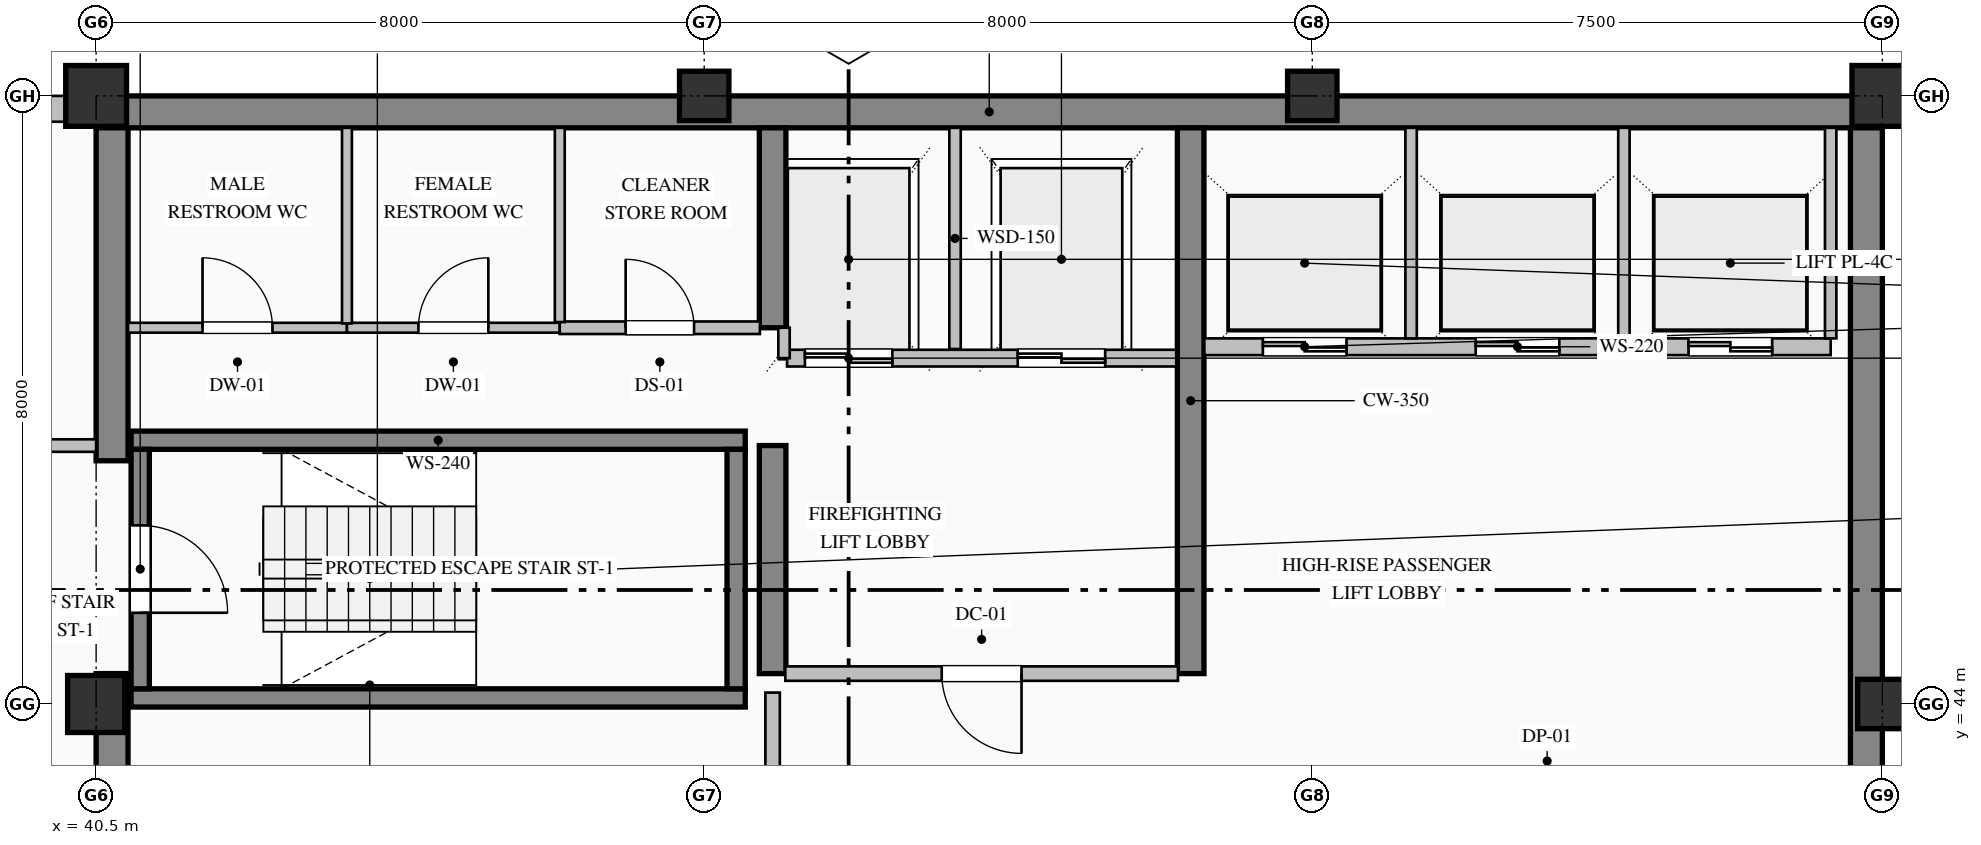
"""IFC4 building model, lengths in metres.
Left out: names, types, materials, properties, quantities, classifications, styles, units other than length and angle.
Written with IfcOpenShell. Run it as: python <this file> out.ifc"""

import sys

from ifc_helpers import new_model, si_unit, direction, frame, frame_2d, origin, origin_2d, place, context, subcontext, project, spatial, rectangle, hollow_rectangle, extrude, element, fill, save


model = new_model("IFC4")
c1 = context("Model", 3, precision=1e-05, world=origin(), true_north=direction((0.0, 1.0)))
c2 = subcontext(c1, "Body", "Model", "MODEL_VIEW")
j1 = project(units=[si_unit("LENGTHUNIT", "METRE"), si_unit("PLANEANGLEUNIT", "RADIAN")], contexts=[c1])
p1 = place(None, origin())
s1 = spatial("IfcSite", under=j1, at=p1, CompositionType="ELEMENT")
p2 = place(p1, origin())
s2 = spatial("IfcBuilding", under=s1, at=p2, CompositionType="ELEMENT")
p3 = place(p2, frame((0.0, 0.0, 335.2)))
s3 = spatial("IfcBuildingStorey", under=s2, at=p3, CompositionType="ELEMENT", Elevation=335.2)
p4 = place(p3, frame((40.5, 51.79, 0.0), z_axis=(0.0, 0.0, 1.0), x_axis=(1.0, 0.0, 0.0)))
e1 = element("IfcWall", 1, at=p4, inside=s3, PredefinedType="SHEAR", context=c2, shape_type="SweptSolid", body=[
    extrude(rectangle(XDim=23.5, YDim=0.42, at=frame_2d((11.75, 0.0))), origin(), (0.0, 0.0, 1.0), 3.785),
])
p5 = place(p3, frame((63.79, 36.32, 0.0), z_axis=(0.0, 0.0, 1.0), x_axis=(0.0, 1.0, 0.0)))
e2 = element("IfcWall", 2, at=p5, inside=s3, PredefinedType="SHEAR", context=c2, shape_type="SweptSolid", body=[
    extrude(rectangle(XDim=15.26, YDim=0.42, at=frame_2d((7.63, 0.0))), origin(), (0.0, 0.0, 1.0), 3.785),
])
p6 = place(p3, frame((40.71, 36.42, 0.0), z_axis=(0.0, 0.0, 1.0), x_axis=(0.0, 1.0, 0.0)))
e3 = element("IfcWall", 3, at=p6, inside=s3, PredefinedType="SHEAR", context=c2, shape_type="SweptSolid", body=[
    extrude(rectangle(XDim=7.98, YDim=0.42, at=frame_2d((3.99, 0.0))), origin(), (0.0, 0.0, 1.0), 3.785),
])
p7 = place(p3, frame((40.71, 47.2, 0.0), z_axis=(0.0, 0.0, 1.0), x_axis=(0.0, 1.0, 0.0)))
e4 = element("IfcWall", 4, at=p7, inside=s3, PredefinedType="SHEAR", context=c2, shape_type="SweptSolid", body=[
    extrude(rectangle(XDim=4.38, YDim=0.42, at=frame_2d((2.19, 0.0))), origin(), (0.0, 0.0, 1.0), 3.785),
])
p8 = place(p3, frame((49.4, 44.4, 0.0), z_axis=(0.0, 0.0, 1.0), x_axis=(0.0, 1.0, 0.0)))
e5 = element("IfcWall", 5, at=p8, inside=s3, PredefinedType="SHEAR", context=c2, shape_type="SweptSolid", body=[
    extrude(rectangle(XDim=3.0, YDim=0.35, at=frame_2d((1.5, 0.0))), origin(), (0.0, 0.0, 1.0), 3.785),
])
p9 = place(p3, frame((49.4, 48.95, 0.0), z_axis=(0.0, 0.0, 1.0), x_axis=(0.0, 1.0, 0.0)))
e6 = element("IfcWall", 6, at=p9, inside=s3, PredefinedType="SHEAR", context=c2, shape_type="SweptSolid", body=[
    extrude(rectangle(XDim=2.63, YDim=0.35, at=frame_2d((1.315, 0.0))), origin(), (0.0, 0.0, 1.0), 3.785),
])
p10 = place(p3, frame((54.9, 44.4, 0.0), z_axis=(0.0, 0.0, 1.0), x_axis=(0.0, 1.0, 0.0)))
e7 = element("IfcWall", 7, at=p10, inside=s3, PredefinedType="SHEAR", context=c2, shape_type="SweptSolid", body=[
    extrude(rectangle(XDim=7.18, YDim=0.35, at=frame_2d((3.59, 0.0))), origin(), (0.0, 0.0, 1.0), 3.785),
])
p11 = place(p3, frame((40.5, 44.0, 0.0), z_axis=(0.0, 0.0, 1.0), x_axis=(1.0, 0.0, 0.0)))
e8 = element("IfcColumn", 8, at=p11, inside=s3, PredefinedType="COLUMN", context=c2, shape_type="SweptSolid", body=[
    extrude(rectangle(XDim=0.75, YDim=0.75, at=origin_2d()), origin(), (0.0, 0.0, 1.0), 4.0),
])
p12 = place(p3, frame((40.5, 52.0, 0.0), z_axis=(0.0, 0.0, 1.0), x_axis=(1.0, 0.0, 0.0)))
e9 = element("IfcColumn", 9, at=p12, inside=s3, PredefinedType="COLUMN", context=c2, shape_type="SweptSolid", body=[
    extrude(hollow_rectangle(XDim=0.8, YDim=0.8, WallThickness=0.032, at=origin_2d()), origin(), (0.0, 0.0, 1.0), 4.0),
])
for number, where, z_axis, x_axis in (
    (10, (48.5, 52.0, 0.0), (0.0, 0.0, 1.0), (1.0, 0.0, 0.0)),
    (11, (56.5, 52.0, 0.0), (0.0, 0.0, 1.0), (1.0, 0.0, 0.0)),
    (12, (64.0, 44.0, 0.0), (0.0, 0.0, 1.0), (1.0, 0.0, 0.0)),
):
    element("IfcColumn", number, at=place(p3, frame(where, z_axis=z_axis, x_axis=x_axis)), inside=s3, PredefinedType="COLUMN", context=c2, shape_type="SweptSolid", body=[
        extrude(hollow_rectangle(XDim=0.65, YDim=0.65, WallThickness=0.028, at=origin_2d()), origin(), (0.0, 0.0, 1.0), 4.0),
    ])
p13 = place(p3, frame((64.0, 52.0, 0.0), z_axis=(0.0, 0.0, 1.0), x_axis=(1.0, 0.0, 0.0)))
e13 = element("IfcColumn", 13, at=p13, inside=s3, PredefinedType="COLUMN", context=c2, shape_type="SweptSolid", body=[
    extrude(hollow_rectangle(XDim=0.8, YDim=0.8, WallThickness=0.032, at=origin_2d()), origin(), (0.0, 0.0, 1.0), 4.0),
])
p14 = place(p3, frame((20.5, 51.83, 0.0), z_axis=(0.0, 0.0, 1.0), x_axis=(1.0, 0.0, 0.0)))
e14 = element("IfcWall", 14, at=p14, inside=s3, PredefinedType="SOLIDWALL", context=c2, shape_type="SweptSolid", body=[
    extrude(rectangle(XDim=20.02, YDim=0.34, at=frame_2d((10.01, 0.0))), origin(), (0.0, 0.0, 1.0), 3.335),
])
p15 = place(p14, frame((6.725, 0.0, 0.9)))
e15 = element("IfcOpeningElement", 15, at=p15, cuts=e14, PredefinedType="OPENING", context=c2, shape_type="SweptSolid", body=[
    extrude(rectangle(XDim=0.95, YDim=1.85, at=frame_2d((0.475, 0.925))), frame((0.0, 0.18, 0.0), z_axis=(0.0, -1.0, 0.0), x_axis=(1.0, 0.0, 0.0)), (0.0, 0.0, 1.0), 0.36),
])
p16 = place(p14, frame((10.275, 0.0, 0.8)))
e16 = element("IfcOpeningElement", 16, at=p16, cuts=e14, PredefinedType="OPENING", context=c2, shape_type="SweptSolid", body=[
    extrude(rectangle(XDim=1.05, YDim=2.15, at=frame_2d((0.525, 1.075))), frame((0.0, 0.18, 0.0), z_axis=(0.0, -1.0, 0.0), x_axis=(1.0, 0.0, 0.0)), (0.0, 0.0, 1.0), 0.36),
])
for number, where, z_axis, x_axis in (
    (17, (40.96, 47.47, 0.0), (0.0, 0.0, 1.0), (1.0, 0.0, 0.0)),
    (18, (49.04, 44.08, 0.0), (0.0, 0.0, 1.0), (-1.0, 0.0, 0.0)),
):
    element("IfcWall", number, at=place(p3, frame(where, z_axis=z_axis, x_axis=x_axis)), inside=s3, PredefinedType="SOLIDWALL", context=c2, shape_type="SweptSolid", body=[
        extrude(rectangle(XDim=8.08, YDim=0.24, at=frame_2d((4.04, 0.0))), origin(), (0.0, 0.0, 1.0), 4.0),
    ])
p17 = place(p3, frame((41.08, 47.35, 0.0), z_axis=(0.0, 0.0, 1.0), x_axis=(0.0, -1.0, 0.0)))
e19 = element("IfcWall", 19, at=p17, inside=s3, PredefinedType="SOLIDWALL", context=c2, shape_type="SweptSolid", body=[
    extrude(rectangle(XDim=3.15, YDim=0.24, at=frame_2d((1.575, 0.0))), origin(), (0.0, 0.0, 1.0), 4.0),
])
p18 = place(p17, frame((1.0, 0.0, 0.0)))
e20 = element("IfcOpeningElement", 20, at=p18, cuts=e19, PredefinedType="OPENING", context=c2, shape_type="SweptSolid", body=[
    extrude(rectangle(XDim=1.15, YDim=2.2, at=frame_2d((0.575, 1.1))), frame((0.0, 0.13, 0.0), z_axis=(0.0, -1.0, 0.0), x_axis=(1.0, 0.0, 0.0)), (0.0, 0.0, 1.0), 0.26),
])
p19 = place(p3, frame((48.92, 44.2, 0.0), z_axis=(0.0, 0.0, 1.0), x_axis=(0.0, 1.0, 0.0)))
e21 = element("IfcWall", 21, at=p19, inside=s3, PredefinedType="SOLIDWALL", context=c2, shape_type="SweptSolid", body=[
    extrude(rectangle(XDim=3.15, YDim=0.24, at=frame_2d((1.575, 0.0))), origin(), (0.0, 0.0, 1.0), 4.0),
])
p20 = place(p3, frame((54.71, 48.55, 0.0), z_axis=(0.0, 0.0, 1.0), x_axis=(-1.0, 0.0, 0.0)))
e22 = element("IfcWall", 22, at=p20, inside=s3, PredefinedType="PARTITIONING", context=c2, shape_type="SweptSolid", body=[
    extrude(rectangle(XDim=5.12, YDim=0.22, at=frame_2d((2.56, 0.0))), origin(), (0.0, 0.0, 1.0), 3.785),
])
p21 = place(p20, frame((3.735, 0.0, 0.0)))
e23 = element("IfcOpeningElement", 23, at=p21, cuts=e22, PredefinedType="OPENING", context=c2, shape_type="SweptSolid", body=[
    extrude(rectangle(XDim=1.15, YDim=2.2, at=frame_2d((0.575, 1.1))), frame((0.0, 0.12, 0.0), z_axis=(0.0, -1.0, 0.0), x_axis=(1.0, 0.0, 0.0)), (0.0, 0.0, 1.0), 0.24),
])
p22 = place(p20, frame((0.935, 0.0, 0.0)))
e24 = element("IfcOpeningElement", 24, at=p22, cuts=e22, PredefinedType="OPENING", context=c2, shape_type="SweptSolid", body=[
    extrude(rectangle(XDim=1.15, YDim=2.2, at=frame_2d((0.575, 1.1))), frame((0.0, 0.12, 0.0), z_axis=(0.0, -1.0, 0.0), x_axis=(1.0, 0.0, 0.0)), (0.0, 0.0, 1.0), 0.24),
])
p23 = place(p3, frame((51.8, 48.67, 0.0), z_axis=(0.0, 0.0, 1.0), x_axis=(0.0, 1.0, 0.0)))
e25 = element("IfcWall", 25, at=p23, inside=s3, PredefinedType="PARTITIONING", context=c2, shape_type="SweptSolid", body=[
    extrude(rectangle(XDim=2.91, YDim=0.15, at=frame_2d((1.455, 0.0))), origin(), (0.0, 0.0, 1.0), 3.785),
])
p24 = place(p3, frame((49.55, 48.55, 0.0), z_axis=(0.0, 0.0, 1.0), x_axis=(0.0, 1.0, 0.0)))
e26 = element("IfcWall", 26, at=p24, inside=s3, PredefinedType="PARTITIONING", context=c2, shape_type="SweptSolid", body=[
    extrude(rectangle(XDim=0.4, YDim=0.15, at=frame_2d((0.2, 0.0))), origin(), (0.0, 0.0, 1.0), 3.785),
])
p25 = place(p3, frame((63.32, 48.7, 0.0), z_axis=(0.0, 0.0, 1.0), x_axis=(-1.0, 0.0, 0.0)))
e27 = element("IfcWall", 27, at=p25, inside=s3, PredefinedType="PARTITIONING", context=c2, shape_type="SweptSolid", body=[
    extrude(rectangle(XDim=8.24, YDim=0.22, at=frame_2d((4.12, 0.0))), origin(), (0.0, 0.0, 1.0), 3.785),
])
p26 = place(p25, frame((6.37, 0.0, 0.0)))
e28 = element("IfcOpeningElement", 28, at=p26, cuts=e27, PredefinedType="OPENING", context=c2, shape_type="SweptSolid", body=[
    extrude(rectangle(XDim=1.1, YDim=2.2, at=frame_2d((0.55, 1.1))), frame((0.0, 0.12, 0.0), z_axis=(0.0, -1.0, 0.0), x_axis=(1.0, 0.0, 0.0)), (0.0, 0.0, 1.0), 0.24),
])
p27 = place(p25, frame((3.57, 0.0, 0.0)))
e29 = element("IfcOpeningElement", 29, at=p27, cuts=e27, PredefinedType="OPENING", context=c2, shape_type="SweptSolid", body=[
    extrude(rectangle(XDim=1.1, YDim=2.2, at=frame_2d((0.55, 1.1))), frame((0.0, 0.12, 0.0), z_axis=(0.0, -1.0, 0.0), x_axis=(1.0, 0.0, 0.0)), (0.0, 0.0, 1.0), 0.24),
])
p28 = place(p25, frame((0.77, 0.0, 0.0)))
e30 = element("IfcOpeningElement", 30, at=p28, cuts=e27, PredefinedType="OPENING", context=c2, shape_type="SweptSolid", body=[
    extrude(rectangle(XDim=1.1, YDim=2.2, at=frame_2d((0.55, 1.1))), frame((0.0, 0.12, 0.0), z_axis=(0.0, -1.0, 0.0), x_axis=(1.0, 0.0, 0.0)), (0.0, 0.0, 1.0), 0.24),
])
for number, where, z_axis, x_axis in (
    (31, (57.8, 48.81, 0.0), (0.0, 0.0, 1.0), (0.0, 1.0, 0.0)),
    (32, (60.6, 48.81, 0.0), (0.0, 0.0, 1.0), (0.0, 1.0, 0.0)),
    (33, (63.32, 48.81, 0.0), (0.0, 0.0, 1.0), (0.0, 1.0, 0.0)),
):
    element("IfcWall", number, at=place(p3, frame(where, z_axis=z_axis, x_axis=x_axis)), inside=s3, PredefinedType="PARTITIONING", context=c2, shape_type="SweptSolid", body=[
        extrude(rectangle(XDim=2.77, YDim=0.15, at=frame_2d((1.385, 0.0))), origin(), (0.0, 0.0, 1.0), 3.785),
    ])
p29 = place(p3, frame((37.8, 47.4, 0.0), z_axis=(0.0, 0.0, 1.0), x_axis=(1.0, 0.0, 0.0)))
e34 = element("IfcWall", 34, at=p29, inside=s3, PredefinedType="PARTITIONING", context=c2, shape_type="SweptSolid", body=[
    extrude(rectangle(XDim=2.7, YDim=0.165, at=frame_2d((1.35, 0.0))), origin(), (0.0, 0.0, 1.0), 3.785),
])
p30 = place(p29, frame((0.825, 0.0, 0.0)))
e35 = element("IfcOpeningElement", 35, at=p30, cuts=e34, PredefinedType="OPENING", context=c2, shape_type="SweptSolid", body=[
    extrude(rectangle(XDim=1.05, YDim=2.15, at=frame_2d((0.525, 1.075))), frame((0.0, 0.093, 0.0), z_axis=(0.0, -1.0, 0.0), x_axis=(1.0, 0.0, 0.0)), (0.0, 0.0, 1.0), 0.185),
])
p31 = place(p3, frame((40.92, 48.95, 0.0), z_axis=(0.0, 0.0, 1.0), x_axis=(1.0, 0.0, 0.0)))
e36 = element("IfcWall", 36, at=p31, inside=s3, PredefinedType="PARTITIONING", context=c2, shape_type="SweptSolid", body=[
    extrude(rectangle(XDim=2.88, YDim=0.13, at=frame_2d((1.44, 0.0))), origin(), (0.0, 0.0, 1.0), 3.785),
])
p32 = place(p31, frame((0.98, 0.0, 0.0)))
e37 = element("IfcOpeningElement", 37, at=p32, cuts=e36, PredefinedType="OPENING", context=c2, shape_type="SweptSolid", body=[
    extrude(rectangle(XDim=0.92, YDim=2.15, at=frame_2d((0.46, 1.075))), frame((0.0, 0.075, 0.0), z_axis=(0.0, -1.0, 0.0), x_axis=(1.0, 0.0, 0.0)), (0.0, 0.0, 1.0), 0.15),
])
p33 = place(p3, frame((43.8, 48.95, 0.0), z_axis=(0.0, 0.0, 1.0), x_axis=(1.0, 0.0, 0.0)))
e38 = element("IfcWall", 38, at=p33, inside=s3, PredefinedType="PARTITIONING", context=c2, shape_type="SweptSolid", body=[
    extrude(rectangle(XDim=2.8, YDim=0.13, at=frame_2d((1.4, 0.0))), origin(), (0.0, 0.0, 1.0), 3.785),
])
p34 = place(p33, frame((0.94, 0.0, 0.0)))
e39 = element("IfcOpeningElement", 39, at=p34, cuts=e38, PredefinedType="OPENING", context=c2, shape_type="SweptSolid", body=[
    extrude(rectangle(XDim=0.92, YDim=2.15, at=frame_2d((0.46, 1.075))), frame((0.0, 0.075, 0.0), z_axis=(0.0, -1.0, 0.0), x_axis=(1.0, 0.0, 0.0)), (0.0, 0.0, 1.0), 0.15),
])
p35 = place(p3, frame((46.6, 48.95, 0.0), z_axis=(0.0, 0.0, 1.0), x_axis=(1.0, 0.0, 0.0)))
e40 = element("IfcWall", 40, at=p35, inside=s3, PredefinedType="PARTITIONING", context=c2, shape_type="SweptSolid", body=[
    extrude(rectangle(XDim=2.633, YDim=0.165, at=frame_2d((1.316, 0.0))), origin(), (0.0, 0.0, 1.0), 3.785),
])
p36 = place(p35, frame((0.866, 0.0, 0.0)))
e41 = element("IfcOpeningElement", 41, at=p36, cuts=e40, PredefinedType="OPENING", context=c2, shape_type="SweptSolid", body=[
    extrude(rectangle(XDim=0.9, YDim=2.15, at=frame_2d((0.45, 1.075))), frame((0.0, 0.093, 0.0), z_axis=(0.0, -1.0, 0.0), x_axis=(1.0, 0.0, 0.0)), (0.0, 0.0, 1.0), 0.185),
])
p37 = place(p3, frame((54.733, 44.4, 0.0), z_axis=(0.0, 0.0, 1.0), x_axis=(-1.0, 0.0, 0.0)))
e42 = element("IfcWall", 42, at=p37, inside=s3, PredefinedType="PARTITIONING", context=c2, shape_type="SweptSolid", body=[
    extrude(rectangle(XDim=5.166, YDim=0.19, at=frame_2d((2.583, 0.0))), origin(), (0.0, 0.0, 1.0), 3.785),
])
p38 = place(p37, frame((2.058, 0.0, 0.0)))
e43 = element("IfcOpeningElement", 43, at=p38, cuts=e42, PredefinedType="OPENING", context=c2, shape_type="SweptSolid", body=[
    extrude(rectangle(XDim=1.05, YDim=2.15, at=frame_2d((0.525, 1.075))), frame((0.0, 0.105, 0.0), z_axis=(0.0, -1.0, 0.0), x_axis=(1.0, 0.0, 0.0)), (0.0, 0.0, 1.0), 0.21),
])
p39 = place(p3, frame((49.4, 40.487, 0.0), z_axis=(0.0, 0.0, 1.0), x_axis=(0.0, 1.0, 0.0)))
e44 = element("IfcWall", 44, at=p39, inside=s3, PredefinedType="PARTITIONING", context=c2, shape_type="SweptSolid", body=[
    extrude(rectangle(XDim=3.663, YDim=0.19, at=frame_2d((1.832, 0.0))), origin(), (0.0, 0.0, 1.0), 3.027),
])
p40 = place(p39, frame((1.132, 0.0, 0.0)))
e45 = element("IfcOpeningElement", 45, at=p40, cuts=e44, PredefinedType="OPENING", context=c2, shape_type="SweptSolid", body=[
    extrude(rectangle(XDim=1.4, YDim=2.25, at=frame_2d((0.7, 1.125))), frame((0.0, 0.105, 0.0), z_axis=(0.0, -1.0, 0.0), x_axis=(1.0, 0.0, 0.0)), (0.0, 0.0, 1.0), 0.21),
])
p41 = place(p3, frame((43.8, 51.58, 0.0), z_axis=(0.0, 0.0, 1.0), x_axis=(0.0, -1.0, 0.0)))
e46 = element("IfcWall", 46, at=p41, inside=s3, PredefinedType="PARTITIONING", context=c2, shape_type="SweptSolid", body=[
    extrude(rectangle(XDim=2.573, YDim=0.13, at=frame_2d((1.287, 0.0))), origin(), (0.0, 0.0, 1.0), 3.785),
])
p42 = place(p3, frame((46.6, 51.58, 0.0), z_axis=(0.0, 0.0, 1.0), x_axis=(0.0, -1.0, 0.0)))
e47 = element("IfcWall", 47, at=p42, inside=s3, PredefinedType="PARTITIONING", context=c2, shape_type="SweptSolid", body=[
    extrude(rectangle(XDim=2.556, YDim=0.13, at=frame_2d((1.278, 0.0))), origin(), (0.0, 0.0, 1.0), 3.785),
])
p43 = place(p18, origin())
e48 = element("IfcDoor", 48, at=p43, inside=s3, OperationType="SINGLE_SWING_RIGHT", PredefinedType="DOOR", context=c2, shape_type="SweptSolid", body=[
    extrude(rectangle(XDim=1.15, YDim=2.2, at=frame_2d((0.575, 1.1))), frame((0.0, 0.025, 0.0), z_axis=(0.0, -1.0, 0.0), x_axis=(1.0, 0.0, 0.0)), (0.0, 0.0, 1.0), 0.05),
])
fill(e20, e48)
p44 = place(p21, origin())
e49 = element("IfcDoor", 49, at=p44, inside=s3, OperationType="DOUBLE_DOOR_SLIDING", PredefinedType="DOOR", context=c2, shape_type="SweptSolid", body=[
    extrude(rectangle(XDim=1.15, YDim=2.2, at=frame_2d((0.575, 1.1))), frame((0.0, 0.025, 0.0), z_axis=(0.0, -1.0, 0.0), x_axis=(1.0, 0.0, 0.0)), (0.0, 0.0, 1.0), 0.05),
])
fill(e23, e49)
p45 = place(p22, origin())
e50 = element("IfcDoor", 50, at=p45, inside=s3, OperationType="DOUBLE_DOOR_SLIDING", PredefinedType="DOOR", context=c2, shape_type="SweptSolid", body=[
    extrude(rectangle(XDim=1.15, YDim=2.2, at=frame_2d((0.575, 1.1))), frame((0.0, 0.025, 0.0), z_axis=(0.0, -1.0, 0.0), x_axis=(1.0, 0.0, 0.0)), (0.0, 0.0, 1.0), 0.05),
])
fill(e24, e50)
p46 = place(p26, origin())
e51 = element("IfcDoor", 51, at=p46, inside=s3, OperationType="DOUBLE_DOOR_SLIDING", PredefinedType="DOOR", context=c2, shape_type="SweptSolid", body=[
    extrude(rectangle(XDim=1.1, YDim=2.2, at=frame_2d((0.55, 1.1))), frame((0.0, 0.025, 0.0), z_axis=(0.0, -1.0, 0.0), x_axis=(1.0, 0.0, 0.0)), (0.0, 0.0, 1.0), 0.05),
])
fill(e28, e51)
p47 = place(p27, origin())
e52 = element("IfcDoor", 52, at=p47, inside=s3, OperationType="DOUBLE_DOOR_SLIDING", PredefinedType="DOOR", context=c2, shape_type="SweptSolid", body=[
    extrude(rectangle(XDim=1.1, YDim=2.2, at=frame_2d((0.55, 1.1))), frame((0.0, 0.025, 0.0), z_axis=(0.0, -1.0, 0.0), x_axis=(1.0, 0.0, 0.0)), (0.0, 0.0, 1.0), 0.05),
])
fill(e29, e52)
p48 = place(p28, origin())
e53 = element("IfcDoor", 53, at=p48, inside=s3, OperationType="DOUBLE_DOOR_SLIDING", PredefinedType="DOOR", context=c2, shape_type="SweptSolid", body=[
    extrude(rectangle(XDim=1.1, YDim=2.2, at=frame_2d((0.55, 1.1))), frame((0.0, 0.025, 0.0), z_axis=(0.0, -1.0, 0.0), x_axis=(1.0, 0.0, 0.0)), (0.0, 0.0, 1.0), 0.05),
])
fill(e30, e53)
p49 = place(p38, origin())
e54 = element("IfcDoor", 54, at=p49, inside=s3, OperationType="SINGLE_SWING_LEFT", PredefinedType="DOOR", context=c2, shape_type="SweptSolid", body=[
    extrude(rectangle(XDim=1.05, YDim=2.15, at=frame_2d((0.525, 1.075))), frame((0.0, 0.025, 0.0), z_axis=(0.0, -1.0, 0.0), x_axis=(1.0, 0.0, 0.0)), (0.0, 0.0, 1.0), 0.05),
])
fill(e43, e54)
p50 = place(p32, origin())
e55 = element("IfcDoor", 55, at=p50, inside=s3, OperationType="SINGLE_SWING_LEFT", PredefinedType="DOOR", context=c2, shape_type="SweptSolid", body=[
    extrude(rectangle(XDim=0.92, YDim=2.15, at=frame_2d((0.46, 1.075))), frame((0.0, 0.025, 0.0), z_axis=(0.0, -1.0, 0.0), x_axis=(1.0, 0.0, 0.0)), (0.0, 0.0, 1.0), 0.05),
])
fill(e37, e55)
p51 = place(p34, origin())
e56 = element("IfcDoor", 56, at=p51, inside=s3, OperationType="SINGLE_SWING_RIGHT", PredefinedType="DOOR", context=c2, shape_type="SweptSolid", body=[
    extrude(rectangle(XDim=0.92, YDim=2.15, at=frame_2d((0.46, 1.075))), frame((0.0, 0.025, 0.0), z_axis=(0.0, -1.0, 0.0), x_axis=(1.0, 0.0, 0.0)), (0.0, 0.0, 1.0), 0.05),
])
fill(e39, e56)
p52 = place(p36, origin())
e57 = element("IfcDoor", 57, at=p52, inside=s3, OperationType="SINGLE_SWING_LEFT", PredefinedType="DOOR", context=c2, shape_type="SweptSolid", body=[
    extrude(rectangle(XDim=0.9, YDim=2.15, at=frame_2d((0.45, 1.075))), frame((0.0, 0.025, 0.0), z_axis=(0.0, -1.0, 0.0), x_axis=(1.0, 0.0, 0.0)), (0.0, 0.0, 1.0), 0.05),
])
fill(e41, e57)
save(model, sys.argv[1])
